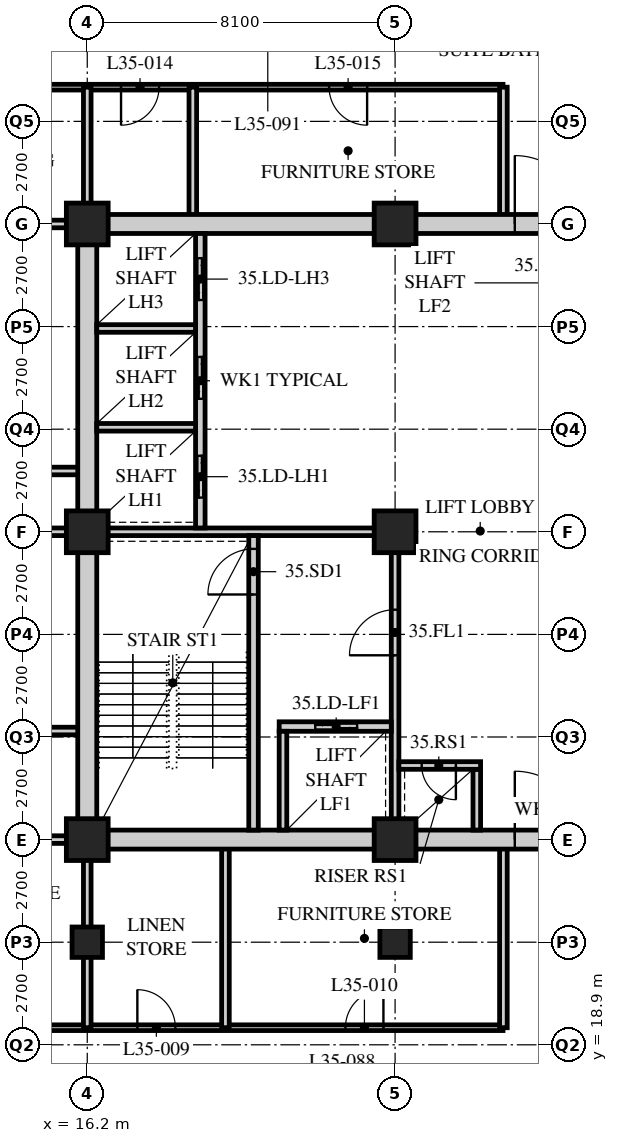
"""IFC4 building model, lengths in metres.
Left out: names, types, materials, properties, quantities, classifications, styles, units other than length and angle.
Written with IfcOpenShell. Run it as: python <this file> out.ifc"""

import sys

from ifc_helpers import new_model, si_unit, direction, frame, frame_2d, origin, origin_2d, place, context, subcontext, project, spatial, rectangle, hollow_rectangle, extrude, element, fill, save


model = new_model("IFC4")
c1 = context("Model", 3, precision=1e-05, world=origin(), true_north=direction((0.0, 1.0)))
c2 = subcontext(c1, "Body", "Model", "MODEL_VIEW")
j1 = project(units=[si_unit("LENGTHUNIT", "METRE"), si_unit("PLANEANGLEUNIT", "RADIAN")], contexts=[c1])
p1 = place(None, origin())
s1 = spatial("IfcSite", under=j1, at=p1, CompositionType="ELEMENT")
p2 = place(p1, origin())
s2 = spatial("IfcBuilding", under=s1, at=p2, CompositionType="ELEMENT")
p3 = place(p2, frame((0.0, 0.0, 137.4)))
s3 = spatial("IfcBuildingStorey", under=s2, at=p3, CompositionType="ELEMENT", Elevation=137.4)
p4 = place(p3, frame((16.2, 21.6, 0.0), z_axis=(0.0, 0.0, 1.0), x_axis=(1.0, 0.0, 0.0)))
e1 = element("IfcColumn", 1, at=p4, inside=s3, PredefinedType="COLUMN", context=c2, shape_type="SweptSolid", body=[
    extrude(hollow_rectangle(XDim=0.8, YDim=0.8, WallThickness=0.08, at=origin_2d()), origin(), (0.0, 0.0, 1.0), 3.4),
])
for number, where, z_axis, x_axis in (
    (2, (16.2, 24.3, 0.0), (0.0, 0.0, 1.0), (1.0, 0.0, 0.0)),
    (3, (16.2, 32.4, 0.0), (0.0, 0.0, 1.0), (1.0, 0.0, 0.0)),
    (4, (16.2, 40.5, 0.0), (0.0, 0.0, 1.0), (1.0, 0.0, 0.0)),
):
    element("IfcColumn", number, at=place(p3, frame(where, z_axis=z_axis, x_axis=x_axis)), inside=s3, PredefinedType="COLUMN", context=c2, shape_type="SweptSolid", body=[
        extrude(hollow_rectangle(XDim=1.1, YDim=1.1, WallThickness=0.1, at=origin_2d()), origin(), (0.0, 0.0, 1.0), 3.4),
    ])
p5 = place(p3, frame((24.3, 21.6, 0.0), z_axis=(0.0, 0.0, 1.0), x_axis=(1.0, 0.0, 0.0)))
e5 = element("IfcColumn", 5, at=p5, inside=s3, PredefinedType="COLUMN", context=c2, shape_type="SweptSolid", body=[
    extrude(hollow_rectangle(XDim=0.8, YDim=0.8, WallThickness=0.08, at=origin_2d()), origin(), (0.0, 0.0, 1.0), 3.4),
])
for number, where, z_axis, x_axis in (
    (6, (24.3, 24.3, 0.0), (0.0, 0.0, 1.0), (1.0, 0.0, 0.0)),
    (7, (24.3, 32.4, 0.0), (0.0, 0.0, 1.0), (1.0, 0.0, 0.0)),
    (8, (24.3, 40.5, 0.0), (0.0, 0.0, 1.0), (1.0, 0.0, 0.0)),
):
    element("IfcColumn", number, at=place(p3, frame(where, z_axis=z_axis, x_axis=x_axis)), inside=s3, PredefinedType="COLUMN", context=c2, shape_type="SweptSolid", body=[
        extrude(hollow_rectangle(XDim=1.1, YDim=1.1, WallThickness=0.1, at=origin_2d()), origin(), (0.0, 0.0, 1.0), 3.4),
    ])
p6 = place(p3, frame((27.14, 44.1, 0.0), z_axis=(0.0, 0.0, 1.0), x_axis=(-1.0, 0.0, 0.0)))
e9 = element("IfcWall", 9, at=p6, inside=s3, PredefinedType="PARTITIONING", context=c2, shape_type="SweptSolid", body=[
    extrude(rectangle(XDim=17.24, YDim=0.15, at=frame_2d((8.62, 0.0))), origin(), (0.0, 0.0, 1.0), 3.19),
])
p7 = place(p6, frame((13.59, 0.0, 0.0)))
e10 = element("IfcOpeningElement", 10, at=p7, cuts=e9, PredefinedType="OPENING", context=c2, shape_type="SweptSolid", body=[
    extrude(rectangle(XDim=1.0, YDim=2.1, at=frame_2d((0.5, 1.05))), frame((0.0, 0.085, 0.0), z_axis=(0.0, -1.0, 0.0), x_axis=(1.0, 0.0, 0.0)), (0.0, 0.0, 1.0), 0.17),
])
p8 = place(p6, frame((9.051, 0.0, 0.0)))
e11 = element("IfcOpeningElement", 11, at=p8, cuts=e9, PredefinedType="OPENING", context=c2, shape_type="SweptSolid", body=[
    extrude(rectangle(XDim=1.0, YDim=2.1, at=frame_2d((0.5, 1.05))), frame((0.0, 0.085, 0.0), z_axis=(0.0, -1.0, 0.0), x_axis=(1.0, 0.0, 0.0)), (0.0, 0.0, 1.0), 0.17),
])
p9 = place(p6, frame((3.576, 0.0, 0.0)))
e12 = element("IfcOpeningElement", 12, at=p9, cuts=e9, PredefinedType="OPENING", context=c2, shape_type="SweptSolid", body=[
    extrude(rectangle(XDim=1.0, YDim=2.1, at=frame_2d((0.5, 1.05))), frame((0.0, 0.085, 0.0), z_axis=(0.0, -1.0, 0.0), x_axis=(1.0, 0.0, 0.0)), (0.0, 0.0, 1.0), 0.17),
])
p10 = place(p3, frame((9.9, 19.35, 0.0), z_axis=(0.0, 0.0, 1.0), x_axis=(1.0, 0.0, 0.0)))
e13 = element("IfcWall", 13, at=p10, inside=s3, PredefinedType="PARTITIONING", context=c2, shape_type="SweptSolid", body=[
    extrude(rectangle(XDim=17.24, YDim=0.15, at=frame_2d((8.62, 0.0))), origin(), (0.0, 0.0, 1.0), 3.19),
])
p11 = place(p10, frame((0.51, 0.0, 0.0)))
e14 = element("IfcOpeningElement", 14, at=p11, cuts=e13, PredefinedType="OPENING", context=c2, shape_type="SweptSolid", body=[
    extrude(rectangle(XDim=1.0, YDim=2.1, at=frame_2d((0.5, 1.05))), frame((0.0, 0.085, 0.0), z_axis=(0.0, -1.0, 0.0), x_axis=(1.0, 0.0, 0.0)), (0.0, 0.0, 1.0), 0.17),
])
p12 = place(p10, frame((3.66, 0.0, 0.0)))
e15 = element("IfcOpeningElement", 15, at=p12, cuts=e13, PredefinedType="OPENING", context=c2, shape_type="SweptSolid", body=[
    extrude(rectangle(XDim=1.0, YDim=2.1, at=frame_2d((0.5, 1.05))), frame((0.0, 0.085, 0.0), z_axis=(0.0, -1.0, 0.0), x_axis=(1.0, 0.0, 0.0)), (0.0, 0.0, 1.0), 0.17),
])
p13 = place(p10, frame((7.618, 0.0, 0.0)))
e16 = element("IfcOpeningElement", 16, at=p13, cuts=e13, PredefinedType="OPENING", context=c2, shape_type="SweptSolid", body=[
    extrude(rectangle(XDim=1.0, YDim=2.1, at=frame_2d((0.5, 1.05))), frame((0.0, 0.085, 0.0), z_axis=(0.0, -1.0, 0.0), x_axis=(1.0, 0.0, 0.0)), (0.0, 0.0, 1.0), 0.17),
])
p14 = place(p10, frame((13.093, 0.0, 0.0)))
e17 = element("IfcOpeningElement", 17, at=p14, cuts=e13, PredefinedType="OPENING", context=c2, shape_type="SweptSolid", body=[
    extrude(rectangle(XDim=1.0, YDim=2.1, at=frame_2d((0.5, 1.05))), frame((0.0, 0.085, 0.0), z_axis=(0.0, -1.0, 0.0), x_axis=(1.0, 0.0, 0.0)), (0.0, 0.0, 1.0), 0.17),
])
for number, where, z_axis, x_axis in (
    (18, (9.9, 32.4, 0.0), (0.0, 0.0, 1.0), (1.0, 0.0, 0.0)),
    (19, (9.9, 27.157, 0.0), (0.0, 0.0, 1.0), (1.0, 0.0, 0.0)),
    (20, (9.9, 34.0, 0.0), (0.0, 0.0, 1.0), (1.0, 0.0, 0.0)),
):
    element("IfcWall", number, at=place(p3, frame(where, z_axis=z_axis, x_axis=x_axis)), inside=s3, PredefinedType="SOLIDWALL", context=c2, shape_type="SweptSolid", body=[
        extrude(rectangle(XDim=6.3, YDim=0.2, at=frame_2d((3.15, 0.0))), origin(), (0.0, 0.0, 1.0), 3.19),
    ])
p15 = place(p3, frame((16.2, 19.35, 0.0), z_axis=(0.0, 0.0, 1.0), x_axis=(0.0, 1.0, 0.0)))
e21 = element("IfcWall", 21, at=p15, inside=s3, PredefinedType="SOLIDWALL", context=c2, shape_type="SweptSolid", body=[
    extrude(rectangle(XDim=4.95, YDim=0.2, at=frame_2d((2.475, 0.0))), origin(), (0.0, 0.0, 1.0), 2.49),
])
for number, where, z_axis, x_axis in (
    (22, (19.836, 19.35, 0.0), (0.0, 0.0, 1.0), (0.0, 1.0, 0.0)),
    (23, (27.15, 19.35, 0.0), (0.0, 0.0, 1.0), (0.0, 1.0, 0.0)),
):
    element("IfcWall", number, at=place(p3, frame(where, z_axis=z_axis, x_axis=x_axis)), inside=s3, PredefinedType="SOLIDWALL", context=c2, shape_type="SweptSolid", body=[
        extrude(rectangle(XDim=4.95, YDim=0.2, at=frame_2d((2.475, 0.0))), origin(), (0.0, 0.0, 1.0), 3.19),
    ])
p16 = place(p3, frame((16.2, 40.5, 0.0), z_axis=(0.0, 0.0, 1.0), x_axis=(0.0, 1.0, 0.0)))
e24 = element("IfcWall", 24, at=p16, inside=s3, PredefinedType="SOLIDWALL", context=c2, shape_type="SweptSolid", body=[
    extrude(rectangle(XDim=3.6, YDim=0.2, at=frame_2d((1.8, 0.0))), origin(), (0.0, 0.0, 1.0), 2.578),
])
for number, where, z_axis, x_axis in (
    (25, (18.978, 44.1, 0.0), (0.0, 0.0, 1.0), (0.0, -1.0, 0.0)),
    (26, (27.15, 40.5, 0.0), (0.0, 0.0, 1.0), (0.0, 1.0, 0.0)),
):
    element("IfcWall", number, at=place(p3, frame(where, z_axis=z_axis, x_axis=x_axis)), inside=s3, PredefinedType="SOLIDWALL", context=c2, shape_type="SweptSolid", body=[
        extrude(rectangle(XDim=3.6, YDim=0.2, at=frame_2d((1.8, 0.0))), origin(), (0.0, 0.0, 1.0), 3.19),
    ])
for number, where, z_axis, x_axis in (
    (27, (9.9, 24.3, 0.0), (0.0, 0.0, 1.0), (1.0, 0.0, 0.0)),
    (28, (9.9, 40.5, 0.0), (0.0, 0.0, 1.0), (1.0, 0.0, 0.0)),
):
    element("IfcWall", number, at=place(p3, frame(where, z_axis=z_axis, x_axis=x_axis)), inside=s3, PredefinedType="SOLIDWALL", context=c2, shape_type="SweptSolid", body=[
        extrude(rectangle(XDim=6.3, YDim=0.2, at=frame_2d((3.15, 0.0))), origin(), (0.0, 0.0, 1.0), 3.19),
    ])
p17 = place(p3, frame((15.95, 24.3, 0.0), z_axis=(0.0, 0.0, 1.0), x_axis=(1.0, 0.0, 0.0)))
e29 = element("IfcWall", 29, at=p17, inside=s3, PredefinedType="SOLIDWALL", context=c2, shape_type="SweptSolid", body=[
    extrude(rectangle(XDim=24.8, YDim=0.5, at=frame_2d((12.4, 0.0))), origin(), (0.0, 0.0, 1.0), 2.54),
])
p18 = place(p17, frame((11.5, 0.0, 0.0)))
e30 = element("IfcOpeningElement", 30, at=p18, cuts=e29, PredefinedType="OPENING", context=c2, shape_type="SweptSolid", body=[
    extrude(rectangle(XDim=1.8, YDim=2.4, at=frame_2d((0.9, 1.2))), frame((0.0, 0.26, 0.0), z_axis=(0.0, -1.0, 0.0), x_axis=(1.0, 0.0, 0.0)), (0.0, 0.0, 1.0), 0.52),
])
p19 = place(p3, frame((15.95, 40.5, 0.0), z_axis=(0.0, 0.0, 1.0), x_axis=(1.0, 0.0, 0.0)))
e31 = element("IfcWall", 31, at=p19, inside=s3, PredefinedType="SOLIDWALL", context=c2, shape_type="SweptSolid", body=[
    extrude(rectangle(XDim=24.8, YDim=0.5, at=frame_2d((12.4, 0.0))), origin(), (0.0, 0.0, 1.0), 2.54),
])
p20 = place(p19, frame((11.5, 0.0, 0.0)))
e32 = element("IfcOpeningElement", 32, at=p20, cuts=e31, PredefinedType="OPENING", context=c2, shape_type="SweptSolid", body=[
    extrude(rectangle(XDim=1.8, YDim=2.4, at=frame_2d((0.9, 1.2))), frame((0.0, 0.26, 0.0), z_axis=(0.0, -1.0, 0.0), x_axis=(1.0, 0.0, 0.0)), (0.0, 0.0, 1.0), 0.52),
])
p21 = place(p3, frame((16.2, 24.55, 0.0), z_axis=(0.0, 0.0, 1.0), x_axis=(0.0, 1.0, 0.0)))
e33 = element("IfcWall", 33, at=p21, inside=s3, PredefinedType="SOLIDWALL", context=c2, shape_type="SweptSolid", body=[
    extrude(rectangle(XDim=15.7, YDim=0.5, at=frame_2d((7.85, 0.0))), origin(), (0.0, 0.0, 1.0), 2.578),
])
p22 = place(p3, frame((16.45, 32.4, 0.0), z_axis=(0.0, 0.0, 1.0), x_axis=(1.0, 0.0, 0.0)))
e34 = element("IfcWall", 34, at=p22, inside=s3, PredefinedType="SOLIDWALL", context=c2, shape_type="SweptSolid", body=[
    extrude(rectangle(XDim=7.95, YDim=0.2, at=frame_2d((3.975, 0.0))), origin(), (0.0, 0.0, 1.0), 2.578),
])
p23 = place(p3, frame((24.3, 24.55, 0.0), z_axis=(0.0, 0.0, 1.0), x_axis=(0.0, 1.0, 0.0)))
e35 = element("IfcWall", 35, at=p23, inside=s3, PredefinedType="SOLIDWALL", context=c2, shape_type="SweptSolid", body=[
    extrude(rectangle(XDim=7.75, YDim=0.2, at=frame_2d((3.875, 0.0))), origin(), (0.0, 0.0, 1.0), 2.578),
])
p24 = place(p23, frame((4.6, 0.0, 0.0)))
e36 = element("IfcOpeningElement", 36, at=p24, cuts=e35, PredefinedType="OPENING", context=c2, shape_type="SweptSolid", body=[
    extrude(rectangle(XDim=1.2, YDim=2.1, at=frame_2d((0.6, 1.05))), frame((0.0, 0.11, 0.0), z_axis=(0.0, -1.0, 0.0), x_axis=(1.0, 0.0, 0.0)), (0.0, 0.0, 1.0), 0.22),
])
p25 = place(p3, frame((20.575, 24.55, 0.0), z_axis=(0.0, 0.0, 1.0), x_axis=(0.0, 1.0, 0.0)))
e37 = element("IfcWall", 37, at=p25, inside=s3, PredefinedType="SOLIDWALL", context=c2, shape_type="SweptSolid", body=[
    extrude(rectangle(XDim=7.75, YDim=0.25, at=frame_2d((3.875, 0.0))), origin(), (0.0, 0.0, 1.0), 3.19),
])
p26 = place(p25, frame((6.2, 0.0, 0.0)))
e38 = element("IfcOpeningElement", 38, at=p26, cuts=e37, PredefinedType="OPENING", context=c2, shape_type="SweptSolid", body=[
    extrude(rectangle(XDim=1.2, YDim=2.1, at=frame_2d((0.6, 1.05))), frame((0.0, 0.135, 0.0), z_axis=(0.0, -1.0, 0.0), x_axis=(1.0, 0.0, 0.0)), (0.0, 0.0, 1.0), 0.27),
])
p27 = place(p3, frame((21.25, 27.275, 0.0), z_axis=(0.0, 0.0, 1.0), x_axis=(1.0, 0.0, 0.0)))
e39 = element("IfcWall", 39, at=p27, inside=s3, PredefinedType="SOLIDWALL", context=c2, shape_type="SweptSolid", body=[
    extrude(rectangle(XDim=2.95, YDim=0.25, at=frame_2d((1.475, 0.0))), origin(), (0.0, 0.0, 1.0), 3.19),
])
p28 = place(p27, frame((0.95, 0.0, 0.0)))
e40 = element("IfcOpeningElement", 40, at=p28, cuts=e39, PredefinedType="OPENING", context=c2, shape_type="SweptSolid", body=[
    extrude(rectangle(XDim=1.1, YDim=2.4, at=frame_2d((0.55, 1.2))), frame((0.0, 0.135, 0.0), z_axis=(0.0, -1.0, 0.0), x_axis=(1.0, 0.0, 0.0)), (0.0, 0.0, 1.0), 0.27),
])
p29 = place(p3, frame((21.35, 24.55, 0.0), z_axis=(0.0, 0.0, 1.0), x_axis=(0.0, 1.0, 0.0)))
e41 = element("IfcWall", 41, at=p29, inside=s3, PredefinedType="SOLIDWALL", context=c2, shape_type="SweptSolid", body=[
    extrude(rectangle(XDim=2.6, YDim=0.2, at=frame_2d((1.3, 0.0))), origin(), (0.0, 0.0, 1.0), 3.19),
])
p30 = place(p3, frame((19.175, 32.5, 0.0), z_axis=(0.0, 0.0, 1.0), x_axis=(0.0, 1.0, 0.0)))
e42 = element("IfcWall", 42, at=p30, inside=s3, PredefinedType="SOLIDWALL", context=c2, shape_type="SweptSolid", body=[
    extrude(rectangle(XDim=7.75, YDim=0.25, at=frame_2d((3.875, 0.0))), origin(), (0.0, 0.0, 1.0), 3.19),
])
p31 = place(p30, frame((0.8, 0.0, 0.0)))
e43 = element("IfcOpeningElement", 43, at=p31, cuts=e42, PredefinedType="OPENING", context=c2, shape_type="SweptSolid", body=[
    extrude(rectangle(XDim=1.1, YDim=2.4, at=frame_2d((0.55, 1.2))), frame((0.0, 0.135, 0.0), z_axis=(0.0, -1.0, 0.0), x_axis=(1.0, 0.0, 0.0)), (0.0, 0.0, 1.0), 0.27),
])
p32 = place(p30, frame((3.4, 0.0, 0.0)))
e44 = element("IfcOpeningElement", 44, at=p32, cuts=e42, PredefinedType="OPENING", context=c2, shape_type="SweptSolid", body=[
    extrude(rectangle(XDim=1.1, YDim=2.4, at=frame_2d((0.55, 1.2))), frame((0.0, 0.135, 0.0), z_axis=(0.0, -1.0, 0.0), x_axis=(1.0, 0.0, 0.0)), (0.0, 0.0, 1.0), 0.27),
])
p33 = place(p30, frame((6.0, 0.0, 0.0)))
e45 = element("IfcOpeningElement", 45, at=p33, cuts=e42, PredefinedType="OPENING", context=c2, shape_type="SweptSolid", body=[
    extrude(rectangle(XDim=1.1, YDim=2.4, at=frame_2d((0.55, 1.2))), frame((0.0, 0.135, 0.0), z_axis=(0.0, -1.0, 0.0), x_axis=(1.0, 0.0, 0.0)), (0.0, 0.0, 1.0), 0.27),
])
for number, where, z_axis, x_axis in (
    (46, (16.45, 35.15, 0.0), (0.0, 0.0, 1.0), (1.0, 0.0, 0.0)),
    (47, (16.45, 37.75, 0.0), (0.0, 0.0, 1.0), (1.0, 0.0, 0.0)),
):
    element("IfcWall", number, at=place(p3, frame(where, z_axis=z_axis, x_axis=x_axis)), inside=s3, PredefinedType="SOLIDWALL", context=c2, shape_type="SweptSolid", body=[
        extrude(rectangle(XDim=2.6, YDim=0.2, at=frame_2d((1.3, 0.0))), origin(), (0.0, 0.0, 1.0), 3.19),
    ])
p34 = place(p3, frame((26.45, 24.55, 0.0), z_axis=(0.0, 0.0, 1.0), x_axis=(0.0, 1.0, 0.0)))
e48 = element("IfcWall", 48, at=p34, inside=s3, PredefinedType="SOLIDWALL", context=c2, shape_type="SweptSolid", body=[
    extrude(rectangle(XDim=1.6, YDim=0.2, at=frame_2d((0.8, 0.0))), origin(), (0.0, 0.0, 1.0), 3.19),
])
p35 = place(p3, frame((24.4, 26.25, 0.0), z_axis=(0.0, 0.0, 1.0), x_axis=(1.0, 0.0, 0.0)))
e49 = element("IfcWall", 49, at=p35, inside=s3, PredefinedType="SOLIDWALL", context=c2, shape_type="SweptSolid", body=[
    extrude(rectangle(XDim=2.15, YDim=0.2, at=frame_2d((1.075, 0.0))), origin(), (0.0, 0.0, 1.0), 3.19),
])
p36 = place(p35, frame((0.6, 0.0, 0.0)))
e50 = element("IfcOpeningElement", 50, at=p36, cuts=e49, PredefinedType="OPENING", context=c2, shape_type="SweptSolid", body=[
    extrude(rectangle(XDim=0.9, YDim=2.1, at=frame_2d((0.45, 1.05))), frame((0.0, 0.11, 0.0), z_axis=(0.0, -1.0, 0.0), x_axis=(1.0, 0.0, 0.0)), (0.0, 0.0, 1.0), 0.22),
])
p37 = place(p13, origin())
e51 = element("IfcDoor", 51, at=p37, inside=s3, OperationType="SINGLE_SWING_LEFT", PredefinedType="DOOR", context=c2, shape_type="SweptSolid", body=[
    extrude(rectangle(XDim=1.0, YDim=2.1, at=frame_2d((0.5, 1.05))), frame((0.0, 0.025, 0.0), z_axis=(0.0, -1.0, 0.0), x_axis=(1.0, 0.0, 0.0)), (0.0, 0.0, 1.0), 0.05),
])
fill(e16, e51)
p38 = place(p14, origin())
e52 = element("IfcDoor", 52, at=p38, inside=s3, OperationType="SINGLE_SWING_RIGHT", PredefinedType="DOOR", context=c2, shape_type="SweptSolid", body=[
    extrude(rectangle(XDim=1.0, YDim=2.1, at=frame_2d((0.5, 1.05))), frame((0.0, 0.025, 0.0), z_axis=(0.0, -1.0, 0.0), x_axis=(1.0, 0.0, 0.0)), (0.0, 0.0, 1.0), 0.05),
])
fill(e17, e52)
p39 = place(p8, origin())
e53 = element("IfcDoor", 53, at=p39, inside=s3, OperationType="SINGLE_SWING_RIGHT", PredefinedType="DOOR", context=c2, shape_type="SweptSolid", body=[
    extrude(rectangle(XDim=1.0, YDim=2.1, at=frame_2d((0.5, 1.05))), frame((0.0, 0.025, 0.0), z_axis=(0.0, -1.0, 0.0), x_axis=(1.0, 0.0, 0.0)), (0.0, 0.0, 1.0), 0.05),
])
fill(e11, e53)
p40 = place(p9, origin())
e54 = element("IfcDoor", 54, at=p40, inside=s3, OperationType="SINGLE_SWING_LEFT", PredefinedType="DOOR", context=c2, shape_type="SweptSolid", body=[
    extrude(rectangle(XDim=1.0, YDim=2.1, at=frame_2d((0.5, 1.05))), frame((0.0, 0.025, 0.0), z_axis=(0.0, -1.0, 0.0), x_axis=(1.0, 0.0, 0.0)), (0.0, 0.0, 1.0), 0.05),
])
fill(e12, e54)
p41 = place(p26, origin())
e55 = element("IfcDoor", 55, at=p41, inside=s3, OperationType="SINGLE_SWING_LEFT", PredefinedType="DOOR", context=c2, shape_type="SweptSolid", body=[
    extrude(rectangle(XDim=1.2, YDim=2.1, at=frame_2d((0.6, 1.05))), frame((0.0, 0.025, 0.0), z_axis=(0.0, -1.0, 0.0), x_axis=(1.0, 0.0, 0.0)), (0.0, 0.0, 1.0), 0.05),
])
fill(e38, e55)
p42 = place(p24, origin())
e56 = element("IfcDoor", 56, at=p42, inside=s3, OperationType="SINGLE_SWING_LEFT", PredefinedType="DOOR", context=c2, shape_type="SweptSolid", body=[
    extrude(rectangle(XDim=1.2, YDim=2.1, at=frame_2d((0.6, 1.05))), frame((0.0, 0.025, 0.0), z_axis=(0.0, -1.0, 0.0), x_axis=(1.0, 0.0, 0.0)), (0.0, 0.0, 1.0), 0.05),
])
fill(e36, e56)
p43 = place(p36, origin())
e57 = element("IfcDoor", 57, at=p43, inside=s3, OperationType="SINGLE_SWING_LEFT", PredefinedType="DOOR", context=c2, shape_type="SweptSolid", body=[
    extrude(rectangle(XDim=0.9, YDim=2.1, at=frame_2d((0.45, 1.05))), frame((0.0, 0.025, 0.0), z_axis=(0.0, -1.0, 0.0), x_axis=(1.0, 0.0, 0.0)), (0.0, 0.0, 1.0), 0.05),
])
fill(e50, e57)
p44 = place(p31, origin())
e58 = element("IfcDoor", 58, at=p44, inside=s3, OperationType="DOUBLE_DOOR_SLIDING", PredefinedType="DOOR", context=c2, shape_type="SweptSolid", body=[
    extrude(rectangle(XDim=1.1, YDim=2.4, at=frame_2d((0.55, 1.2))), frame((0.0, 0.025, 0.0), z_axis=(0.0, -1.0, 0.0), x_axis=(1.0, 0.0, 0.0)), (0.0, 0.0, 1.0), 0.05),
])
fill(e43, e58)
p45 = place(p32, origin())
e59 = element("IfcDoor", 59, at=p45, inside=s3, OperationType="DOUBLE_DOOR_SLIDING", PredefinedType="DOOR", context=c2, shape_type="SweptSolid", body=[
    extrude(rectangle(XDim=1.1, YDim=2.4, at=frame_2d((0.55, 1.2))), frame((0.0, 0.025, 0.0), z_axis=(0.0, -1.0, 0.0), x_axis=(1.0, 0.0, 0.0)), (0.0, 0.0, 1.0), 0.05),
])
fill(e44, e59)
p46 = place(p33, origin())
e60 = element("IfcDoor", 60, at=p46, inside=s3, OperationType="DOUBLE_DOOR_SLIDING", PredefinedType="DOOR", context=c2, shape_type="SweptSolid", body=[
    extrude(rectangle(XDim=1.1, YDim=2.4, at=frame_2d((0.55, 1.2))), frame((0.0, 0.025, 0.0), z_axis=(0.0, -1.0, 0.0), x_axis=(1.0, 0.0, 0.0)), (0.0, 0.0, 1.0), 0.05),
])
fill(e45, e60)
p47 = place(p28, origin())
e61 = element("IfcDoor", 61, at=p47, inside=s3, OperationType="DOUBLE_DOOR_SLIDING", PredefinedType="DOOR", context=c2, shape_type="SweptSolid", body=[
    extrude(rectangle(XDim=1.1, YDim=2.4, at=frame_2d((0.55, 1.2))), frame((0.0, 0.025, 0.0), z_axis=(0.0, -1.0, 0.0), x_axis=(1.0, 0.0, 0.0)), (0.0, 0.0, 1.0), 0.05),
])
fill(e40, e61)
p48 = place(p18, origin())
e62 = element("IfcDoor", 62, at=p48, inside=s3, OperationType="DOUBLE_DOOR_SINGLE_SWING", PredefinedType="DOOR", context=c2, shape_type="SweptSolid", body=[
    extrude(rectangle(XDim=1.8, YDim=2.4, at=frame_2d((0.9, 1.2))), frame((0.0, 0.025, 0.0), z_axis=(0.0, -1.0, 0.0), x_axis=(1.0, 0.0, 0.0)), (0.0, 0.0, 1.0), 0.05),
])
fill(e30, e62)
p49 = place(p20, origin())
e63 = element("IfcDoor", 63, at=p49, inside=s3, OperationType="DOUBLE_DOOR_SINGLE_SWING", PredefinedType="DOOR", context=c2, shape_type="SweptSolid", body=[
    extrude(rectangle(XDim=1.8, YDim=2.4, at=frame_2d((0.9, 1.2))), frame((0.0, 0.025, 0.0), z_axis=(0.0, -1.0, 0.0), x_axis=(1.0, 0.0, 0.0)), (0.0, 0.0, 1.0), 0.05),
])
fill(e32, e63)
save(model, sys.argv[1])
